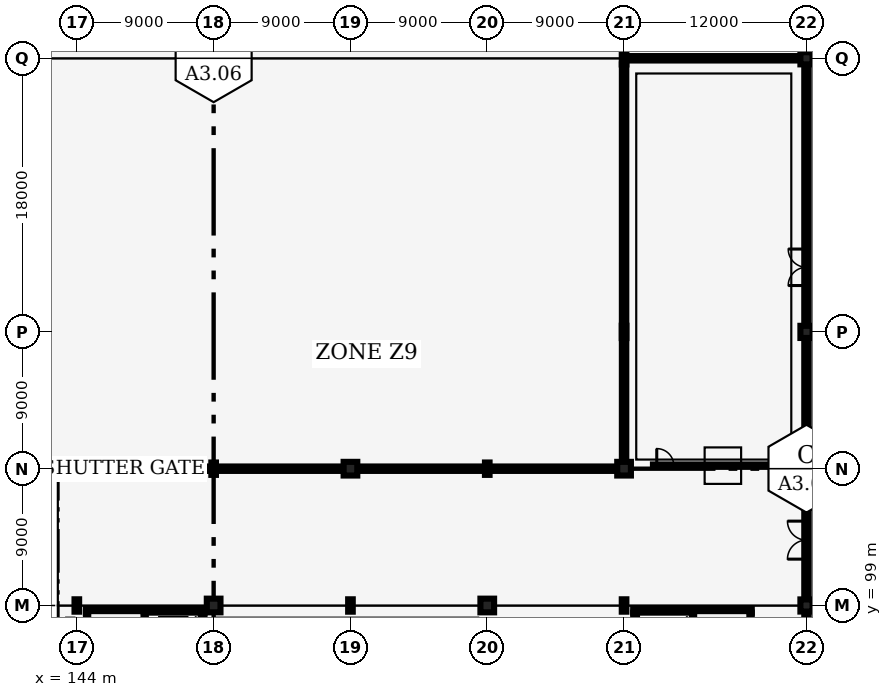
"""IFC4 building model, lengths in metres.
Left out: names, types, materials, properties, quantities, classifications, styles, units other than length and angle.
Written with IfcOpenShell. Run it as: python <this file> out.ifc"""

import sys

from ifc_helpers import new_model, si_unit, direction, frame, frame_2d, origin, origin_2d, place, context, subcontext, project, spatial, rectangle, i_section, extrude, element, fill, save


model = new_model("IFC4")
c1 = context("Model", 3, precision=1e-05, world=origin(), true_north=direction((0.0, 1.0)))
c2 = subcontext(c1, "Body", "Model", "MODEL_VIEW")
j1 = project(units=[si_unit("LENGTHUNIT", "METRE"), si_unit("PLANEANGLEUNIT", "RADIAN")], contexts=[c1])
p1 = place(None, origin())
s1 = spatial("IfcSite", under=j1, at=p1, CompositionType="ELEMENT")
p2 = place(p1, origin())
s2 = spatial("IfcBuilding", under=s1, at=p2, CompositionType="ELEMENT")
p3 = place(p2, origin())
s3 = spatial("IfcBuildingStorey", under=s2, at=p3, CompositionType="ELEMENT", Elevation=0.0)
p4 = place(p3, frame((144.0, 99.0, 0.0), z_axis=(0.0, 0.0, 1.0), x_axis=(1.0, 0.0, 0.0)))
e1 = element("IfcColumn", 1, at=p4, inside=s3, PredefinedType="COLUMN", context=c2, shape_type="SweptSolid", body=[
    extrude(i_section(OverallWidth=0.303, OverallDepth=0.814, WebThickness=0.021, FlangeThickness=0.04, FilletRadius=0.03, at=origin_2d()), origin(), (0.0, 0.0, 1.0), 6.0),
])
for number, where, z_axis, x_axis in (
    (2, (144.0, 108.0, 0.0), (0.0, 0.0, 1.0), (1.0, 0.0, 0.0)),
    (3, (153.0, 99.0, 0.0), (0.0, 0.0, 1.0), (1.0, 0.0, 0.0)),
):
    element("IfcColumn", number, at=place(p3, frame(where, z_axis=z_axis, x_axis=x_axis)), inside=s3, PredefinedType="COLUMN", context=c2, shape_type="SweptSolid", body=[
        extrude(rectangle(XDim=0.9, YDim=0.9, at=origin_2d()), origin(), (0.0, 0.0, 1.0), 6.0),
    ])
for number, where, z_axis, x_axis in (
    (4, (153.0, 108.0, 0.0), (0.0, 0.0, 1.0), (1.0, 0.0, 0.0)),
    (5, (162.0, 99.0, 0.0), (0.0, 0.0, 1.0), (1.0, 0.0, 0.0)),
):
    element("IfcColumn", number, at=place(p3, frame(where, z_axis=z_axis, x_axis=x_axis)), inside=s3, PredefinedType="COLUMN", context=c2, shape_type="SweptSolid", body=[
        extrude(i_section(OverallWidth=0.303, OverallDepth=0.814, WebThickness=0.021, FlangeThickness=0.04, FilletRadius=0.03, at=origin_2d()), origin(), (0.0, 0.0, 1.0), 6.0),
    ])
for number, where, z_axis, x_axis in (
    (6, (162.0, 108.0, 0.0), (0.0, 0.0, 1.0), (1.0, 0.0, 0.0)),
    (7, (171.0, 99.0, 0.0), (0.0, 0.0, 1.0), (1.0, 0.0, 0.0)),
):
    element("IfcColumn", number, at=place(p3, frame(where, z_axis=z_axis, x_axis=x_axis)), inside=s3, PredefinedType="COLUMN", context=c2, shape_type="SweptSolid", body=[
        extrude(rectangle(XDim=0.9, YDim=0.9, at=origin_2d()), origin(), (0.0, 0.0, 1.0), 6.0),
    ])
for number, where, z_axis, x_axis in (
    (8, (171.0, 108.0, 0.0), (0.0, 0.0, 1.0), (1.0, 0.0, 0.0)),
    (9, (180.0, 99.0, 0.0), (0.0, 0.0, 1.0), (1.0, 0.0, 0.0)),
):
    element("IfcColumn", number, at=place(p3, frame(where, z_axis=z_axis, x_axis=x_axis)), inside=s3, PredefinedType="COLUMN", context=c2, shape_type="SweptSolid", body=[
        extrude(i_section(OverallWidth=0.303, OverallDepth=0.814, WebThickness=0.021, FlangeThickness=0.04, FilletRadius=0.03, at=origin_2d()), origin(), (0.0, 0.0, 1.0), 6.0),
    ])
p5 = place(p3, frame((180.0, 108.0, 0.0), z_axis=(0.0, 0.0, 1.0), x_axis=(1.0, 0.0, 0.0)))
e10 = element("IfcColumn", 10, at=p5, inside=s3, PredefinedType="COLUMN", context=c2, shape_type="SweptSolid", body=[
    extrude(rectangle(XDim=0.9, YDim=0.9, at=origin_2d()), origin(), (0.0, 0.0, 1.0), 6.0),
])
for number, where, z_axis, x_axis in (
    (11, (180.0, 117.0, 0.0), (0.0, 0.0, 1.0), (1.0, 0.0, 0.0)),
    (12, (180.0, 135.0, 0.0), (0.0, 0.0, 1.0), (1.0, 0.0, 0.0)),
):
    element("IfcColumn", number, at=place(p3, frame(where, z_axis=z_axis, x_axis=x_axis)), inside=s3, PredefinedType="COLUMN", context=c2, shape_type="SweptSolid", body=[
        extrude(i_section(OverallWidth=0.303, OverallDepth=0.814, WebThickness=0.021, FlangeThickness=0.04, FilletRadius=0.03, at=origin_2d()), origin(), (0.0, 0.0, 1.0), 6.0),
    ])
p6 = place(p3, frame((192.0, 99.0, 0.0), z_axis=(0.0, 0.0, 1.0), x_axis=(1.0, 0.0, 0.0)))
e13 = element("IfcColumn", 13, at=p6, inside=s3, PredefinedType="COLUMN", context=c2, shape_type="SweptSolid", body=[
    extrude(rectangle(XDim=0.8, YDim=0.8, at=origin_2d()), origin(), (0.0, 0.0, 1.0), 6.0),
])
p7 = place(p3, frame((192.0, 108.0, 0.0), z_axis=(0.0, 0.0, 1.0), x_axis=(1.0, 0.0, 0.0)))
e14 = element("IfcColumn", 14, at=p7, inside=s3, PredefinedType="COLUMN", context=c2, shape_type="SweptSolid", body=[
    extrude(i_section(OverallWidth=0.304, OverallDepth=0.716, WebThickness=0.021, FlangeThickness=0.04, FilletRadius=0.027, at=origin_2d()), origin(), (0.0, 0.0, 1.0), 6.0),
])
for number, where, z_axis, x_axis in (
    (15, (192.0, 117.0, 0.0), (0.0, 0.0, 1.0), (1.0, 0.0, 0.0)),
    (16, (192.0, 135.0, 0.0), (0.0, 0.0, 1.0), (1.0, 0.0, 0.0)),
):
    element("IfcColumn", number, at=place(p3, frame(where, z_axis=z_axis, x_axis=x_axis)), inside=s3, PredefinedType="COLUMN", context=c2, shape_type="SweptSolid", body=[
        extrude(rectangle(XDim=0.8, YDim=0.8, at=origin_2d()), origin(), (0.0, 0.0, 1.0), 6.0),
    ])
p8 = place(p3, frame((192.0, 90.353, 0.0), z_axis=(0.0, 0.0, 1.0), x_axis=(0.0, 1.0, 0.0)))
e17 = element("IfcWall", 17, at=p8, inside=s3, PredefinedType="SOLIDWALL", context=c2, shape_type="SweptSolid", body=[
    extrude(rectangle(XDim=8.252, YDim=0.29, at=frame_2d((4.126, 0.0))), origin(), (0.0, 0.0, 1.0), 4.95),
])
p9 = place(p8, frame((2.697, 0.0, 0.0)))
e18 = element("IfcOpeningElement", 18, at=p9, cuts=e17, PredefinedType="OPENING", context=c2, shape_type="SweptSolid", body=[
    extrude(rectangle(XDim=1.9, YDim=2.2, at=frame_2d((0.95, 1.1))), frame((0.0, 0.155, 0.0), z_axis=(0.0, -1.0, 0.0), x_axis=(1.0, 0.0, 0.0)), (0.0, 0.0, 1.0), 0.31),
])
p10 = place(p3, frame((192.0, 99.395, 0.0), z_axis=(0.0, 0.0, 1.0), x_axis=(0.0, 1.0, 0.0)))
e19 = element("IfcWall", 19, at=p10, inside=s3, PredefinedType="SOLIDWALL", context=c2, shape_type="SweptSolid", body=[
    extrude(rectangle(XDim=8.252, YDim=0.29, at=frame_2d((4.126, 0.0))), origin(), (0.0, 0.0, 1.0), 4.95),
])
p11 = place(p10, frame((2.655, 0.0, 0.0)))
e20 = element("IfcOpeningElement", 20, at=p11, cuts=e19, PredefinedType="OPENING", context=c2, shape_type="SweptSolid", body=[
    extrude(rectangle(XDim=2.5, YDim=2.5, at=frame_2d((1.25, 1.25))), frame((0.0, 0.155, 0.0), z_axis=(0.0, -1.0, 0.0), x_axis=(1.0, 0.0, 0.0)), (0.0, 0.0, 1.0), 0.31),
])
p12 = place(p3, frame((192.0, 108.353, 0.0), z_axis=(0.0, 0.0, 1.0), x_axis=(0.0, 1.0, 0.0)))
e21 = element("IfcWall", 21, at=p12, inside=s3, PredefinedType="SOLIDWALL", context=c2, shape_type="SweptSolid", body=[
    extrude(rectangle(XDim=8.252, YDim=0.29, at=frame_2d((4.126, 0.0))), origin(), (0.0, 0.0, 1.0), 4.95),
])
p13 = place(p12, frame((1.597, 0.0, 0.85)))
e22 = element("IfcOpeningElement", 22, at=p13, cuts=e21, PredefinedType="OPENING", context=c2, shape_type="SweptSolid", body=[
    extrude(rectangle(XDim=2.2, YDim=2.1, at=frame_2d((1.1, 1.05))), frame((0.0, 0.155, 0.0), z_axis=(0.0, -1.0, 0.0), x_axis=(1.0, 0.0, 0.0)), (0.0, 0.0, 1.0), 0.31),
])
p14 = place(p12, frame((4.997, 0.0, 0.85)))
e23 = element("IfcOpeningElement", 23, at=p14, cuts=e21, PredefinedType="OPENING", context=c2, shape_type="SweptSolid", body=[
    extrude(rectangle(XDim=2.0, YDim=2.1, at=frame_2d((1.0, 1.05))), frame((0.0, 0.155, 0.0), z_axis=(0.0, -1.0, 0.0), x_axis=(1.0, 0.0, 0.0)), (0.0, 0.0, 1.0), 0.31),
])
p15 = place(p3, frame((192.0, 117.395, 0.0), z_axis=(0.0, 0.0, 1.0), x_axis=(0.0, 1.0, 0.0)))
e24 = element("IfcWall", 24, at=p15, inside=s3, PredefinedType="SOLIDWALL", context=c2, shape_type="SweptSolid", body=[
    extrude(rectangle(XDim=17.21, YDim=0.29, at=frame_2d((8.605, 0.0))), origin(), (0.0, 0.0, 1.0), 4.95),
])
p16 = place(p15, frame((2.655, 0.0, 0.0)))
e25 = element("IfcOpeningElement", 25, at=p16, cuts=e24, PredefinedType="OPENING", context=c2, shape_type="SweptSolid", body=[
    extrude(rectangle(XDim=2.4, YDim=2.45, at=frame_2d((1.2, 1.225))), frame((0.0, 0.155, 0.0), z_axis=(0.0, -1.0, 0.0), x_axis=(1.0, 0.0, 0.0)), (0.0, 0.0, 1.0), 0.31),
])
p17 = place(p3, frame((135.146, 108.0, 0.0), z_axis=(0.0, 0.0, 1.0), x_axis=(1.0, 0.0, 0.0)))
e26 = element("IfcWall", 26, at=p17, inside=s3, PredefinedType="SOLIDWALL", context=c2, shape_type="SweptSolid", body=[
    extrude(rectangle(XDim=8.408, YDim=0.32, at=frame_2d((4.204, 0.0))), origin(), (0.0, 0.0, 1.0), 4.95),
])
p18 = place(p17, frame((1.154, 0.0, 0.0)))
e27 = element("IfcOpeningElement", 27, at=p18, cuts=e26, PredefinedType="OPENING", context=c2, shape_type="SweptSolid", body=[
    extrude(rectangle(XDim=6.4, YDim=3.2, at=frame_2d((3.2, 1.6))), frame((0.0, 0.17, 0.0), z_axis=(0.0, -1.0, 0.0), x_axis=(1.0, 0.0, 0.0)), (0.0, 0.0, 1.0), 0.34),
])
p19 = place(p3, frame((144.445, 108.0, 0.0), z_axis=(0.0, 0.0, 1.0), x_axis=(1.0, 0.0, 0.0)))
e28 = element("IfcWall", 28, at=p19, inside=s3, PredefinedType="SOLIDWALL", context=c2, shape_type="SweptSolid", body=[
    extrude(rectangle(XDim=8.408, YDim=0.29, at=frame_2d((4.204, 0.0))), origin(), (0.0, 0.0, 1.0), 4.95),
])
p20 = place(p19, frame((2.605, 0.0, 3.3)))
e29 = element("IfcOpeningElement", 29, at=p20, cuts=e28, PredefinedType="OPENING", context=c2, shape_type="SweptSolid", body=[
    extrude(rectangle(XDim=2.5, YDim=1.15, at=frame_2d((1.25, 0.575))), frame((0.0, 0.155, 0.0), z_axis=(0.0, -1.0, 0.0), x_axis=(1.0, 0.0, 0.0)), (0.0, 0.0, 1.0), 0.31),
])
p21 = place(p3, frame((153.146, 108.0, 0.0), z_axis=(0.0, 0.0, 1.0), x_axis=(1.0, 0.0, 0.0)))
e30 = element("IfcWall", 30, at=p21, inside=s3, PredefinedType="SOLIDWALL", context=c2, shape_type="SweptSolid", body=[
    extrude(rectangle(XDim=8.408, YDim=0.29, at=frame_2d((4.204, 0.0))), origin(), (0.0, 0.0, 1.0), 4.95),
])
p22 = place(p21, frame((2.904, 0.0, 3.3)))
e31 = element("IfcOpeningElement", 31, at=p22, cuts=e30, PredefinedType="OPENING", context=c2, shape_type="SweptSolid", body=[
    extrude(rectangle(XDim=2.5, YDim=1.15, at=frame_2d((1.25, 0.575))), frame((0.0, 0.155, 0.0), z_axis=(0.0, -1.0, 0.0), x_axis=(1.0, 0.0, 0.0)), (0.0, 0.0, 1.0), 0.31),
])
p23 = place(p3, frame((162.445, 108.0, 0.0), z_axis=(0.0, 0.0, 1.0), x_axis=(1.0, 0.0, 0.0)))
e32 = element("IfcWall", 32, at=p23, inside=s3, PredefinedType="SOLIDWALL", context=c2, shape_type="SweptSolid", body=[
    extrude(rectangle(XDim=8.408, YDim=0.29, at=frame_2d((4.204, 0.0))), origin(), (0.0, 0.0, 1.0), 4.95),
])
p24 = place(p23, frame((2.605, 0.0, 3.3)))
e33 = element("IfcOpeningElement", 33, at=p24, cuts=e32, PredefinedType="OPENING", context=c2, shape_type="SweptSolid", body=[
    extrude(rectangle(XDim=2.5, YDim=1.15, at=frame_2d((1.25, 0.575))), frame((0.0, 0.155, 0.0), z_axis=(0.0, -1.0, 0.0), x_axis=(1.0, 0.0, 0.0)), (0.0, 0.0, 1.0), 0.31),
])
p25 = place(p3, frame((171.146, 108.0, 0.0), z_axis=(0.0, 0.0, 1.0), x_axis=(1.0, 0.0, 0.0)))
e34 = element("IfcWall", 34, at=p25, inside=s3, PredefinedType="SOLIDWALL", context=c2, shape_type="SweptSolid", body=[
    extrude(rectangle(XDim=8.408, YDim=0.29, at=frame_2d((4.204, 0.0))), origin(), (0.0, 0.0, 1.0), 4.95),
])
p26 = place(p25, frame((2.904, 0.0, 3.3)))
e35 = element("IfcOpeningElement", 35, at=p26, cuts=e34, PredefinedType="OPENING", context=c2, shape_type="SweptSolid", body=[
    extrude(rectangle(XDim=2.5, YDim=1.15, at=frame_2d((1.25, 0.575))), frame((0.0, 0.155, 0.0), z_axis=(0.0, -1.0, 0.0), x_axis=(1.0, 0.0, 0.0)), (0.0, 0.0, 1.0), 0.31),
])
p27 = place(p3, frame((180.146, 135.0, 0.0), z_axis=(0.0, 0.0, 1.0), x_axis=(1.0, 0.0, 0.0)))
e36 = element("IfcWall", 36, at=p27, inside=s3, PredefinedType="SOLIDWALL", context=c2, shape_type="SweptSolid", body=[
    extrude(rectangle(XDim=11.458, YDim=0.29, at=frame_2d((5.729, 0.0))), origin(), (0.0, 0.0, 1.0), 4.95),
])
p28 = place(p3, frame((180.0, 108.445, 0.0), z_axis=(0.0, 0.0, 1.0), x_axis=(0.0, 1.0, 0.0)))
e37 = element("IfcWall", 37, at=p28, inside=s3, PredefinedType="SOLIDWALL", context=c2, shape_type="SweptSolid", body=[
    extrude(rectangle(XDim=26.153, YDim=0.29, at=frame_2d((13.076, 0.0))), origin(), (0.0, 0.0, 1.0), 4.95),
])
p29 = place(p3, frame((180.725, 90.47, 0.0), z_axis=(0.0, 0.0, 1.0), x_axis=(0.0, 1.0, 0.0)))
e38 = element("IfcWall", 38, at=p29, inside=s3, PredefinedType="SHEAR", context=c2, shape_type="SweptSolid", body=[
    extrude(rectangle(XDim=8.06, YDim=0.25, at=frame_2d((4.03, 0.0))), origin(), (0.0, 0.0, 1.0), 5.64),
])
p30 = place(p29, frame((1.15, 0.0, 0.0)))
e39 = element("IfcOpeningElement", 39, at=p30, cuts=e38, PredefinedType="OPENING", context=c2, shape_type="SweptSolid", body=[
    extrude(rectangle(XDim=1.6, YDim=2.2, at=frame_2d((0.8, 1.1))), frame((0.0, 0.135, 0.0), z_axis=(0.0, -1.0, 0.0), x_axis=(1.0, 0.0, 0.0)), (0.0, 0.0, 1.0), 0.27),
])
p31 = place(p3, frame((188.275, 90.47, 0.0), z_axis=(0.0, 0.0, 1.0), x_axis=(0.0, 1.0, 0.0)))
e40 = element("IfcWall", 40, at=p31, inside=s3, PredefinedType="SHEAR", context=c2, shape_type="SweptSolid", body=[
    extrude(rectangle(XDim=8.06, YDim=0.25, at=frame_2d((4.03, 0.0))), origin(), (0.0, 0.0, 1.0), 5.64),
])
p32 = place(p3, frame((180.6, 98.655, 0.0), z_axis=(0.0, 0.0, 1.0), x_axis=(1.0, 0.0, 0.0)))
e41 = element("IfcWall", 41, at=p32, inside=s3, PredefinedType="SHEAR", context=c2, shape_type="SweptSolid", body=[
    extrude(rectangle(XDim=7.8, YDim=0.25, at=frame_2d((3.9, 0.0))), origin(), (0.0, 0.0, 1.0), 5.64),
])
p33 = place(p3, frame((184.585, 90.47, 0.0), z_axis=(0.0, 0.0, 1.0), x_axis=(0.0, 1.0, 0.0)))
e42 = element("IfcWall", 42, at=p33, inside=s3, PredefinedType="SHEAR", context=c2, shape_type="SweptSolid", body=[
    extrude(rectangle(XDim=8.06, YDim=0.25, at=frame_2d((4.03, 0.0))), origin(), (0.0, 0.0, 1.0), 5.64),
])
p34 = place(p33, frame((0.25, 0.0, 0.0)))
e43 = element("IfcOpeningElement", 43, at=p34, cuts=e42, PredefinedType="OPENING", context=c2, shape_type="SweptSolid", body=[
    extrude(rectangle(XDim=1.15, YDim=2.15, at=frame_2d((0.575, 1.075))), frame((0.0, 0.135, 0.0), z_axis=(0.0, -1.0, 0.0), x_axis=(1.0, 0.0, 0.0)), (0.0, 0.0, 1.0), 0.27),
])
p35 = place(p3, frame((144.725, 90.47, 0.0), z_axis=(0.0, 0.0, 1.0), x_axis=(0.0, 1.0, 0.0)))
e44 = element("IfcWall", 44, at=p35, inside=s3, PredefinedType="SHEAR", context=c2, shape_type="SweptSolid", body=[
    extrude(rectangle(XDim=8.06, YDim=0.25, at=frame_2d((4.03, 0.0))), origin(), (0.0, 0.0, 1.0), 5.64),
])
p36 = place(p3, frame((152.275, 90.47, 0.0), z_axis=(0.0, 0.0, 1.0), x_axis=(0.0, 1.0, 0.0)))
e45 = element("IfcWall", 45, at=p36, inside=s3, PredefinedType="SHEAR", context=c2, shape_type="SweptSolid", body=[
    extrude(rectangle(XDim=8.06, YDim=0.25, at=frame_2d((4.03, 0.0))), origin(), (0.0, 0.0, 1.0), 5.64),
])
p37 = place(p36, frame((1.15, 0.0, 0.0)))
e46 = element("IfcOpeningElement", 46, at=p37, cuts=e45, PredefinedType="OPENING", context=c2, shape_type="SweptSolid", body=[
    extrude(rectangle(XDim=1.8, YDim=2.2, at=frame_2d((0.9, 1.1))), frame((0.0, 0.135, 0.0), z_axis=(0.0, -1.0, 0.0), x_axis=(1.0, 0.0, 0.0)), (0.0, 0.0, 1.0), 0.27),
])
p38 = place(p3, frame((144.6, 98.655, 0.0), z_axis=(0.0, 0.0, 1.0), x_axis=(1.0, 0.0, 0.0)))
e47 = element("IfcWall", 47, at=p38, inside=s3, PredefinedType="SHEAR", context=c2, shape_type="SweptSolid", body=[
    extrude(rectangle(XDim=7.8, YDim=0.25, at=frame_2d((3.9, 0.0))), origin(), (0.0, 0.0, 1.0), 5.64),
])
p39 = place(p3, frame((148.415, 90.47, 0.0), z_axis=(0.0, 0.0, 1.0), x_axis=(0.0, 1.0, 0.0)))
e48 = element("IfcWall", 48, at=p39, inside=s3, PredefinedType="SHEAR", context=c2, shape_type="SweptSolid", body=[
    extrude(rectangle(XDim=8.06, YDim=0.25, at=frame_2d((4.03, 0.0))), origin(), (0.0, 0.0, 1.0), 5.64),
])
p40 = place(p39, frame((0.25, 0.0, 0.0)))
e49 = element("IfcOpeningElement", 49, at=p40, cuts=e48, PredefinedType="OPENING", context=c2, shape_type="SweptSolid", body=[
    extrude(rectangle(XDim=1.15, YDim=2.15, at=frame_2d((0.575, 1.075))), frame((0.0, 0.135, 0.0), z_axis=(0.0, -1.0, 0.0), x_axis=(1.0, 0.0, 0.0)), (0.0, 0.0, 1.0), 0.27),
])
p41 = place(p3, frame((181.9, 108.2, 0.0), z_axis=(0.0, 0.0, 1.0), x_axis=(1.0, 0.0, 0.0)))
e50 = element("IfcWall", 50, at=p41, inside=s3, PredefinedType="PARTITIONING", context=c2, shape_type="SweptSolid", body=[
    extrude(rectangle(XDim=9.2, YDim=0.155, at=frame_2d((4.6, 0.0))), origin(), (0.0, 0.0, 1.0), 4.85),
])
p42 = place(p41, frame((0.25, 0.0, 0.0)))
e51 = element("IfcOpeningElement", 51, at=p42, cuts=e50, PredefinedType="OPENING", context=c2, shape_type="SweptSolid", body=[
    extrude(rectangle(XDim=1.12, YDim=2.2, at=frame_2d((0.56, 1.1))), frame((0.0, 0.087, 0.0), z_axis=(0.0, -1.0, 0.0), x_axis=(1.0, 0.0, 0.0)), (0.0, 0.0, 1.0), 0.175),
])
p43 = place(p11, origin())
e52 = element("IfcDoor", 52, at=p43, inside=s3, OperationType="DOUBLE_DOOR_SINGLE_SWING", PredefinedType="DOOR", context=c2, shape_type="SweptSolid", body=[
    extrude(rectangle(XDim=2.5, YDim=2.5, at=frame_2d((1.25, 1.25))), frame((0.0, 0.025, 0.0), z_axis=(0.0, -1.0, 0.0), x_axis=(1.0, 0.0, 0.0)), (0.0, 0.0, 1.0), 0.05),
])
fill(e20, e52)
p44 = place(p13, origin())
e53 = element("IfcWindow", 53, at=p44, inside=s3, PartitioningType="SINGLE_PANEL", PredefinedType="WINDOW", context=c2, shape_type="SweptSolid", body=[
    extrude(rectangle(XDim=2.2, YDim=2.1, at=frame_2d((1.1, 1.05))), frame((0.0, 0.03, 0.0), z_axis=(0.0, -1.0, 0.0), x_axis=(1.0, 0.0, 0.0)), (0.0, 0.0, 1.0), 0.06),
])
fill(e22, e53)
p45 = place(p14, origin())
e54 = element("IfcWindow", 54, at=p45, inside=s3, PartitioningType="SINGLE_PANEL", PredefinedType="WINDOW", context=c2, shape_type="SweptSolid", body=[
    extrude(rectangle(XDim=2.0, YDim=2.1, at=frame_2d((1.0, 1.05))), frame((0.0, 0.03, 0.0), z_axis=(0.0, -1.0, 0.0), x_axis=(1.0, 0.0, 0.0)), (0.0, 0.0, 1.0), 0.06),
])
fill(e23, e54)
p46 = place(p16, origin())
e55 = element("IfcDoor", 55, at=p46, inside=s3, OperationType="DOUBLE_DOOR_SINGLE_SWING", PredefinedType="DOOR", context=c2, shape_type="SweptSolid", body=[
    extrude(rectangle(XDim=2.4, YDim=2.45, at=frame_2d((1.2, 1.225))), frame((0.0, 0.025, 0.0), z_axis=(0.0, -1.0, 0.0), x_axis=(1.0, 0.0, 0.0)), (0.0, 0.0, 1.0), 0.05),
])
fill(e25, e55)
p47 = place(p18, origin())
e56 = element("IfcDoor", 56, at=p47, inside=s3, OperationType="ROLLINGUP", PredefinedType="GATE", context=c2, shape_type="SweptSolid", body=[
    extrude(rectangle(XDim=6.4, YDim=3.2, at=frame_2d((3.2, 1.6))), frame((0.0, 0.025, 0.0), z_axis=(0.0, -1.0, 0.0), x_axis=(1.0, 0.0, 0.0)), (0.0, 0.0, 1.0), 0.05),
])
fill(e27, e56)
p48 = place(p20, origin())
e57 = element("IfcWindow", 57, at=p48, inside=s3, PartitioningType="SINGLE_PANEL", PredefinedType="WINDOW", context=c2, shape_type="SweptSolid", body=[
    extrude(rectangle(XDim=2.5, YDim=1.15, at=frame_2d((1.25, 0.575))), frame((0.0, 0.03, 0.0), z_axis=(0.0, -1.0, 0.0), x_axis=(1.0, 0.0, 0.0)), (0.0, 0.0, 1.0), 0.06),
])
fill(e29, e57)
p49 = place(p22, origin())
e58 = element("IfcWindow", 58, at=p49, inside=s3, PartitioningType="SINGLE_PANEL", PredefinedType="WINDOW", context=c2, shape_type="SweptSolid", body=[
    extrude(rectangle(XDim=2.5, YDim=1.15, at=frame_2d((1.25, 0.575))), frame((0.0, 0.03, 0.0), z_axis=(0.0, -1.0, 0.0), x_axis=(1.0, 0.0, 0.0)), (0.0, 0.0, 1.0), 0.06),
])
fill(e31, e58)
p50 = place(p24, origin())
e59 = element("IfcWindow", 59, at=p50, inside=s3, PartitioningType="SINGLE_PANEL", PredefinedType="WINDOW", context=c2, shape_type="SweptSolid", body=[
    extrude(rectangle(XDim=2.5, YDim=1.15, at=frame_2d((1.25, 0.575))), frame((0.0, 0.03, 0.0), z_axis=(0.0, -1.0, 0.0), x_axis=(1.0, 0.0, 0.0)), (0.0, 0.0, 1.0), 0.06),
])
fill(e33, e59)
p51 = place(p26, origin())
e60 = element("IfcWindow", 60, at=p51, inside=s3, PartitioningType="SINGLE_PANEL", PredefinedType="WINDOW", context=c2, shape_type="SweptSolid", body=[
    extrude(rectangle(XDim=2.5, YDim=1.15, at=frame_2d((1.25, 0.575))), frame((0.0, 0.03, 0.0), z_axis=(0.0, -1.0, 0.0), x_axis=(1.0, 0.0, 0.0)), (0.0, 0.0, 1.0), 0.06),
])
fill(e35, e60)
p52 = place(p42, origin())
e61 = element("IfcDoor", 61, at=p52, inside=s3, OperationType="SINGLE_SWING_LEFT", PredefinedType="DOOR", context=c2, shape_type="SweptSolid", body=[
    extrude(rectangle(XDim=1.12, YDim=2.2, at=frame_2d((0.56, 1.1))), frame((0.0, 0.025, 0.0), z_axis=(0.0, -1.0, 0.0), x_axis=(1.0, 0.0, 0.0)), (0.0, 0.0, 1.0), 0.05),
])
fill(e51, e61)
save(model, sys.argv[1])
